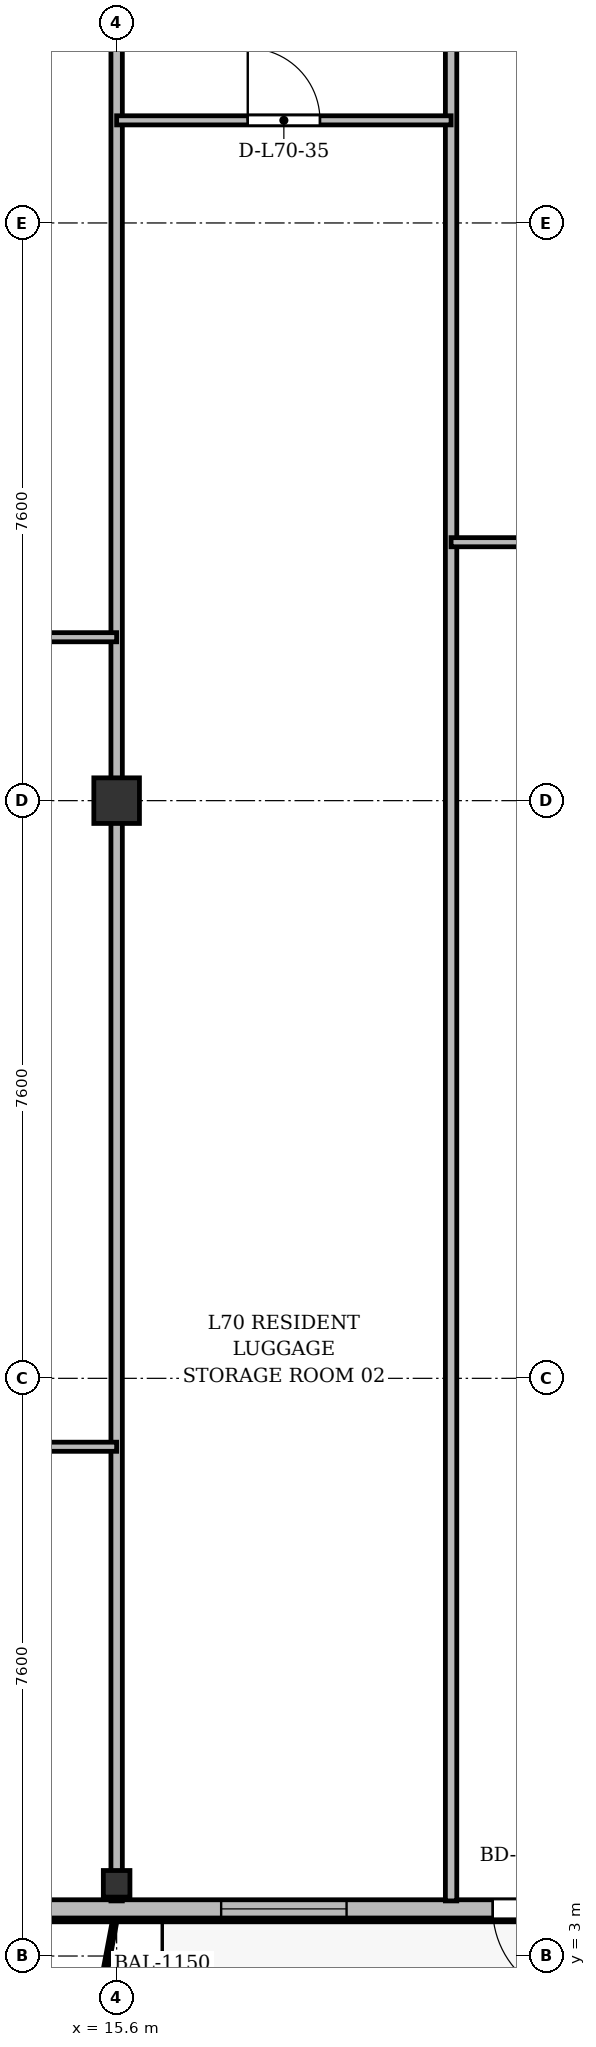
"""IFC4 building model, lengths in metres.
Left out: names, types, materials, properties, quantities, classifications, styles, units other than length and angle.
Written with IfcOpenShell. Run it as: python <this file> out.ifc"""

import sys

from ifc_helpers import new_model, si_unit, direction, frame, frame_2d, origin, origin_2d, place, context, subcontext, project, spatial, rectangle, i_section, extrude, source, transform, mapped, element, fill, save


model = new_model("IFC4")
c1 = context("Model", 3, precision=1e-05, world=origin(), true_north=direction((0.0, 1.0)))
c2 = subcontext(c1, "Body", "Model", "MODEL_VIEW")
j1 = project(units=[si_unit("LENGTHUNIT", "METRE"), si_unit("PLANEANGLEUNIT", "RADIAN")], contexts=[c1])
p1 = place(None, origin())
s1 = spatial("IfcSite", under=j1, at=p1, CompositionType="ELEMENT")
p2 = place(p1, origin())
s2 = spatial("IfcBuilding", under=s1, at=p2, CompositionType="ELEMENT")
p3 = place(p2, frame((0.0, 0.0, 270.3)))
s3 = spatial("IfcBuildingStorey", under=s2, at=p3, CompositionType="ELEMENT", Elevation=270.3)
m1 = source(origin(), c2, "Body", "SweptSolid", [
    extrude(i_section(OverallWidth=0.35, OverallDepth=0.35, WebThickness=0.018, FlangeThickness=0.028, at=origin_2d()), origin(), (0.0, 0.0, 1.0), 3.6),
])
p4 = place(p3, frame((15.6, 3.95, 0.0), z_axis=(0.0, 0.0, 1.0), x_axis=(1.0, 0.0, 0.0)))
e1 = element("IfcColumn", 1, at=p4, inside=s3, PredefinedType="COLUMN", context=c2, shape_type="MappedRepresentation", body=[
    mapped(m1, transform((0.0, 0.0, 0.0), x_axis=(1.0, 0.0, 0.0), y_axis=(0.0, 1.0, 0.0), z_axis=(0.0, 0.0, 1.0), scale=1.0)),
])
m2 = source(origin(), c2, "Body", "SweptSolid", [
    extrude(rectangle(XDim=0.6, YDim=0.6, at=origin_2d()), origin(), (0.0, 0.0, 1.0), 3.6),
])
p5 = place(p3, frame((15.6, 18.2, 0.0), z_axis=(0.0, 0.0, 1.0), x_axis=(1.0, 0.0, 0.0)))
e2 = element("IfcColumn", 2, at=p5, inside=s3, PredefinedType="COLUMN", context=c2, shape_type="MappedRepresentation", body=[
    mapped(m2, transform((0.0, 0.0, 0.0), x_axis=(1.0, 0.0, 0.0), y_axis=(0.0, 1.0, 0.0), z_axis=(0.0, 0.0, 1.0), scale=1.0)),
])
p6 = place(p3, frame((63.2, 3.62, 0.0), z_axis=(0.0, 0.0, 1.0), x_axis=(-1.0, 0.0, 0.0)))
e3 = element("IfcWall", 3, at=p6, inside=s3, PredefinedType="SOLIDWALL", context=c2, shape_type="SweptSolid", body=[
    extrude(rectangle(XDim=52.0, YDim=0.24, at=frame_2d((26.0, 0.0))), origin(), (0.0, 0.0, 1.0), 3.37),
])
p7 = place(p6, frame((1.345, 0.0, 0.9)))
e4 = element("IfcOpeningElement", 4, at=p7, cuts=e3, PredefinedType="OPENING", context=c2, shape_type="SweptSolid", body=[
    extrude(rectangle(XDim=1.8, YDim=1.8, at=frame_2d((0.9, 0.9))), frame((0.0, 0.13, 0.0), z_axis=(0.0, -1.0, 0.0), x_axis=(1.0, 0.0, 0.0)), (0.0, 0.0, 1.0), 0.26),
])
p8 = place(p6, frame((5.1, 0.0, 0.9)))
e5 = element("IfcOpeningElement", 5, at=p8, cuts=e3, PredefinedType="OPENING", context=c2, shape_type="SweptSolid", body=[
    extrude(rectangle(XDim=2.2, YDim=1.8, at=frame_2d((1.1, 0.9))), frame((0.0, 0.13, 0.0), z_axis=(0.0, -1.0, 0.0), x_axis=(1.0, 0.0, 0.0)), (0.0, 0.0, 1.0), 0.26),
])
p9 = place(p6, frame((9.35, 0.0, 0.9)))
e6 = element("IfcOpeningElement", 6, at=p9, cuts=e3, PredefinedType="OPENING", context=c2, shape_type="SweptSolid", body=[
    extrude(rectangle(XDim=1.5, YDim=1.75, at=frame_2d((0.75, 0.875))), frame((0.0, 0.13, 0.0), z_axis=(0.0, -1.0, 0.0), x_axis=(1.0, 0.0, 0.0)), (0.0, 0.0, 1.0), 0.26),
])
p10 = place(p6, frame((14.017, 0.0, 0.0)))
e7 = element("IfcOpeningElement", 7, at=p10, cuts=e3, PredefinedType="OPENING", context=c2, shape_type="SweptSolid", body=[
    extrude(rectangle(XDim=1.2, YDim=2.2, at=frame_2d((0.6, 1.1))), frame((0.0, 0.13, 0.0), z_axis=(0.0, -1.0, 0.0), x_axis=(1.0, 0.0, 0.0)), (0.0, 0.0, 1.0), 0.26),
])
p11 = place(p6, frame((25.175, 0.0, 0.9)))
e8 = element("IfcOpeningElement", 8, at=p11, cuts=e3, PredefinedType="OPENING", context=c2, shape_type="SweptSolid", body=[
    extrude(rectangle(XDim=1.65, YDim=1.85, at=frame_2d((0.825, 0.925))), frame((0.0, 0.13, 0.0), z_axis=(0.0, -1.0, 0.0), x_axis=(1.0, 0.0, 0.0)), (0.0, 0.0, 1.0), 0.26),
])
p12 = place(p6, frame((33.01, 0.0, 0.9)))
e9 = element("IfcOpeningElement", 9, at=p12, cuts=e3, PredefinedType="OPENING", context=c2, shape_type="SweptSolid", body=[
    extrude(rectangle(XDim=1.8, YDim=1.8, at=frame_2d((0.9, 0.9))), frame((0.0, 0.13, 0.0), z_axis=(0.0, -1.0, 0.0), x_axis=(1.0, 0.0, 0.0)), (0.0, 0.0, 1.0), 0.26),
])
p13 = place(p6, frame((35.45, 0.0, 0.9)))
e10 = element("IfcOpeningElement", 10, at=p13, cuts=e3, PredefinedType="OPENING", context=c2, shape_type="SweptSolid", body=[
    extrude(rectangle(XDim=1.5, YDim=1.75, at=frame_2d((0.75, 0.875))), frame((0.0, 0.13, 0.0), z_axis=(0.0, -1.0, 0.0), x_axis=(1.0, 0.0, 0.0)), (0.0, 0.0, 1.0), 0.26),
])
p14 = place(p6, frame((37.85, 0.0, 0.9)))
e11 = element("IfcOpeningElement", 11, at=p14, cuts=e3, PredefinedType="OPENING", context=c2, shape_type="SweptSolid", body=[
    extrude(rectangle(XDim=1.5, YDim=1.75, at=frame_2d((0.75, 0.875))), frame((0.0, 0.13, 0.0), z_axis=(0.0, -1.0, 0.0), x_axis=(1.0, 0.0, 0.0)), (0.0, 0.0, 1.0), 0.26),
])
p15 = place(p6, frame((41.452, 0.0, 0.0)))
e12 = element("IfcOpeningElement", 12, at=p15, cuts=e3, PredefinedType="OPENING", context=c2, shape_type="SweptSolid", body=[
    extrude(rectangle(XDim=1.2, YDim=2.2, at=frame_2d((0.6, 1.1))), frame((0.0, 0.13, 0.0), z_axis=(0.0, -1.0, 0.0), x_axis=(1.0, 0.0, 0.0)), (0.0, 0.0, 1.0), 0.26),
])
p16 = place(p6, frame((44.575, 0.0, 0.9)))
e13 = element("IfcOpeningElement", 13, at=p16, cuts=e3, PredefinedType="OPENING", context=c2, shape_type="SweptSolid", body=[
    extrude(rectangle(XDim=1.65, YDim=1.85, at=frame_2d((0.825, 0.925))), frame((0.0, 0.13, 0.0), z_axis=(0.0, -1.0, 0.0), x_axis=(1.0, 0.0, 0.0)), (0.0, 0.0, 1.0), 0.26),
])
p17 = place(p6, frame((48.855, 0.0, 0.9)))
e14 = element("IfcOpeningElement", 14, at=p17, cuts=e3, PredefinedType="OPENING", context=c2, shape_type="SweptSolid", body=[
    extrude(rectangle(XDim=1.8, YDim=1.8, at=frame_2d((0.9, 0.9))), frame((0.0, 0.13, 0.0), z_axis=(0.0, -1.0, 0.0), x_axis=(1.0, 0.0, 0.0)), (0.0, 0.0, 1.0), 0.26),
])
p18 = place(p3, frame((15.6, 3.725, 0.0), z_axis=(0.0, 0.0, 1.0), x_axis=(0.0, 1.0, 0.0)))
e15 = element("IfcWall", 15, at=p18, inside=s3, PredefinedType="PARTITIONING", context=c2, shape_type="SweptSolid", body=[
    extrude(rectangle(XDim=27.275, YDim=0.15, at=frame_2d((13.637, 0.0))), origin(), (0.0, 0.0, 1.0), 2.87),
])
p19 = place(p3, frame((20.0, 3.725, 0.0), z_axis=(0.0, 0.0, 1.0), x_axis=(0.0, 1.0, 0.0)))
e16 = element("IfcWall", 16, at=p19, inside=s3, PredefinedType="PARTITIONING", context=c2, shape_type="SweptSolid", body=[
    extrude(rectangle(XDim=27.275, YDim=0.15, at=frame_2d((13.637, 0.0))), origin(), (0.0, 0.0, 1.0), 2.92),
])
p20 = place(p3, frame((8.44, 20.35, 0.0), z_axis=(0.0, 0.0, 1.0), x_axis=(1.0, 0.0, 0.0)))
e17 = element("IfcWall", 17, at=p20, inside=s3, PredefinedType="PARTITIONING", context=c2, shape_type="SweptSolid", body=[
    extrude(rectangle(XDim=7.16, YDim=0.12, at=frame_2d((3.58, 0.0))), origin(), (0.0, 0.0, 1.0), 2.87),
])
p21 = place(p20, frame((3.105, 0.0, 0.0)))
e18 = element("IfcOpeningElement", 18, at=p21, cuts=e17, PredefinedType="OPENING", context=c2, shape_type="SweptSolid", body=[
    extrude(rectangle(XDim=0.95, YDim=2.15, at=frame_2d((0.475, 1.075))), frame((0.0, 0.07, 0.0), z_axis=(0.0, -1.0, 0.0), x_axis=(1.0, 0.0, 0.0)), (0.0, 0.0, 1.0), 0.14),
])
p22 = place(p3, frame((8.44, 9.7, 0.0), z_axis=(0.0, 0.0, 1.0), x_axis=(1.0, 0.0, 0.0)))
e19 = element("IfcWall", 19, at=p22, inside=s3, PredefinedType="PARTITIONING", context=c2, shape_type="SweptSolid", body=[
    extrude(rectangle(XDim=7.16, YDim=0.12, at=frame_2d((3.58, 0.0))), origin(), (0.0, 0.0, 1.0), 2.87),
])
p23 = place(p22, frame((3.105, 0.0, 0.0)))
e20 = element("IfcOpeningElement", 20, at=p23, cuts=e19, PredefinedType="OPENING", context=c2, shape_type="SweptSolid", body=[
    extrude(rectangle(XDim=0.95, YDim=2.15, at=frame_2d((0.475, 1.075))), frame((0.0, 0.07, 0.0), z_axis=(0.0, -1.0, 0.0), x_axis=(1.0, 0.0, 0.0)), (0.0, 0.0, 1.0), 0.14),
])
p24 = place(p3, frame((15.6, 27.15, 0.0), z_axis=(0.0, 0.0, 1.0), x_axis=(1.0, 0.0, 0.0)))
e21 = element("IfcWall", 21, at=p24, inside=s3, PredefinedType="PARTITIONING", context=c2, shape_type="SweptSolid", body=[
    extrude(rectangle(XDim=4.4, YDim=0.12, at=frame_2d((2.2, 0.0))), origin(), (0.0, 0.0, 1.0), 2.87),
])
p25 = place(p24, frame((1.725, 0.0, 0.0)))
e22 = element("IfcOpeningElement", 22, at=p25, cuts=e21, PredefinedType="OPENING", context=c2, shape_type="SweptSolid", body=[
    extrude(rectangle(XDim=0.95, YDim=2.15, at=frame_2d((0.475, 1.075))), frame((0.0, 0.07, 0.0), z_axis=(0.0, -1.0, 0.0), x_axis=(1.0, 0.0, 0.0)), (0.0, 0.0, 1.0), 0.14),
])
p26 = place(p3, frame((20.0, 21.6, 0.0), z_axis=(0.0, 0.0, 1.0), x_axis=(1.0, 0.0, 0.0)))
e23 = element("IfcWall", 23, at=p26, inside=s3, PredefinedType="PARTITIONING", context=c2, shape_type="SweptSolid", body=[
    extrude(rectangle(XDim=3.4, YDim=0.12, at=frame_2d((1.7, 0.0))), origin(), (0.0, 0.0, 1.0), 2.87),
])
p27 = place(p26, frame((1.131, 0.0, 0.0)))
e24 = element("IfcOpeningElement", 24, at=p27, cuts=e23, PredefinedType="OPENING", context=c2, shape_type="SweptSolid", body=[
    extrude(rectangle(XDim=0.95, YDim=2.15, at=frame_2d((0.475, 1.075))), frame((0.0, 0.07, 0.0), z_axis=(0.0, -1.0, 0.0), x_axis=(1.0, 0.0, 0.0)), (0.0, 0.0, 1.0), 0.14),
])
m3 = source(origin(), c2, "Body", "SweptSolid", [
    extrude(rectangle(XDim=1.2, YDim=2.2, at=frame_2d((0.6, 1.1))), frame((0.0, 0.025, 0.0), z_axis=(0.0, -1.0, 0.0), x_axis=(1.0, 0.0, 0.0)), (0.0, 0.0, 1.0), 0.05),
])
p28 = place(p15, origin())
e25 = element("IfcDoor", 25, at=p28, inside=s3, OperationType="SINGLE_SWING_LEFT", PredefinedType="DOOR", context=c2, shape_type="MappedRepresentation", body=[
    mapped(m3, transform((0.0, 0.0, 0.0), x_axis=(1.0, 0.0, 0.0), y_axis=(0.0, 1.0, 0.0), z_axis=(0.0, 0.0, 1.0), scale=1.0)),
])
fill(e12, e25)
m4 = source(origin(), c2, "Body", "SweptSolid", [
    extrude(rectangle(XDim=1.65, YDim=1.85, at=frame_2d((0.825, 0.925))), frame((0.0, 0.03, 0.0), z_axis=(0.0, -1.0, 0.0), x_axis=(1.0, 0.0, 0.0)), (0.0, 0.0, 1.0), 0.06),
])
p29 = place(p16, origin())
e26 = element("IfcWindow", 26, at=p29, inside=s3, PartitioningType="SINGLE_PANEL", PredefinedType="WINDOW", context=c2, shape_type="MappedRepresentation", body=[
    mapped(m4, transform((0.0, 0.0, 0.0), x_axis=(1.0, 0.0, 0.0), y_axis=(0.0, 1.0, 0.0), z_axis=(0.0, 0.0, 1.0), scale=1.0)),
])
fill(e13, e26)
m5 = source(origin(), c2, "Body", "SweptSolid", [
    extrude(rectangle(XDim=0.95, YDim=2.15, at=frame_2d((0.475, 1.075))), frame((0.0, 0.025, 0.0), z_axis=(0.0, -1.0, 0.0), x_axis=(1.0, 0.0, 0.0)), (0.0, 0.0, 1.0), 0.05),
])
p30 = place(p25, origin())
e27 = element("IfcDoor", 27, at=p30, inside=s3, OperationType="SINGLE_SWING_LEFT", PredefinedType="DOOR", context=c2, shape_type="MappedRepresentation", body=[
    mapped(m5, transform((0.0, 0.0, 0.0), x_axis=(1.0, 0.0, 0.0), y_axis=(0.0, 1.0, 0.0), z_axis=(0.0, 0.0, 1.0), scale=1.0)),
])
fill(e22, e27)
save(model, sys.argv[1])
